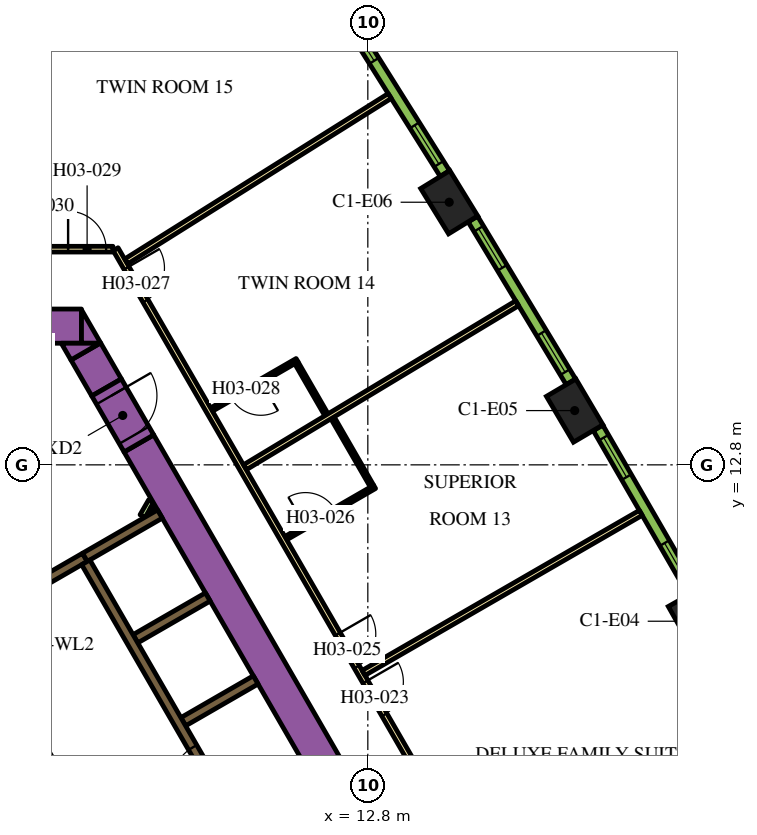
"""IFC4 building model, lengths in metres.
Left out: names, types, materials, properties, quantities, classifications, styles, units other than length and angle.
Written with IfcOpenShell. Run it as: python <this file> out.ifc"""

import sys

from ifc_helpers import new_model, si_unit, direction, frame, frame_2d, origin, origin_2d, place, context, subcontext, project, spatial, polyline, rectangle, outline, extrude, element, fill, save


model = new_model("IFC4")
c1 = context("Model", 3, precision=1e-05, world=origin(), true_north=direction((0.0, 1.0)))
c2 = subcontext(c1, "Body", "Model", "MODEL_VIEW")
j1 = project(units=[si_unit("LENGTHUNIT", "METRE"), si_unit("PLANEANGLEUNIT", "RADIAN")], contexts=[c1])
p1 = place(None, origin())
s1 = spatial("IfcSite", under=j1, at=p1, CompositionType="ELEMENT")
p2 = place(p1, origin())
s2 = spatial("IfcBuilding", under=s1, at=p2, CompositionType="ELEMENT")
p3 = place(p2, frame((0.0, 0.0, 58.8)))
s3 = spatial("IfcBuildingStorey", under=s2, at=p3, CompositionType="ELEMENT", Elevation=58.8)
for number, where, z_axis, x_axis in (
    (1, (21.443, 8.685, 0.0), (0.0, 0.0, 1.0), (-0.492, 0.871, 0.0)),
    (2, (18.243, 14.228, 0.0), (0.0, 0.0, 1.0), (-0.508, 0.861, 0.0)),
    (3, (14.942, 19.71, 0.0), (0.0, 0.0, 1.0), (-0.524, 0.852, 0.0)),
):
    element("IfcColumn", number, at=place(p3, frame(where, z_axis=z_axis, x_axis=x_axis)), inside=s3, PredefinedType="COLUMN", context=c2, shape_type="SweptSolid", body=[
        extrude(rectangle(XDim=1.4, YDim=0.9, at=origin_2d()), origin(), (0.0, 0.0, 1.0), 3.9),
    ])
p4 = place(p3, frame((6.776, 13.364, 0.0), z_axis=(0.0, 0.0, 1.0), x_axis=(0.500004177138, -0.8660229921, 0.0)))
e4 = element("IfcWall", 4, at=p4, inside=s3, PredefinedType="SOLIDWALL", context=c2, shape_type="SweptSolid", body=[
    extrude(rectangle(XDim=20.204, YDim=0.9, at=frame_2d((10.102, 0.0))), origin(), (0.0, 0.0, 1.0), 3.9),
])
p5 = place(p3, frame((-4.224, 16.45, 0.0), z_axis=(0.0, 0.0, 1.0), x_axis=(1.0, 0.0, 0.0)))
e5 = element("IfcWall", 5, at=p5, inside=s3, PredefinedType="SOLIDWALL", context=c2, shape_type="SweptSolid", body=[
    extrude(rectangle(XDim=9.488, YDim=0.9, at=frame_2d((4.744, 0.0))), origin(), (0.0, 0.0, 1.0), 3.9),
])
p6 = place(p3, origin())
e6 = element("IfcWall", 6, at=p6, inside=s3, PredefinedType="SOLIDWALL", context=c2, shape_type="SweptSolid", body=[
    extrude(outline(polyline([(5.265, 16.0), (5.265, 16.88), (5.773, 16.0), (5.265, 16.0)])), origin(), (0.0, 0.0, 1.0), 3.9),
])
p7 = place(p3, frame((5.926, 14.836, 0.0), z_axis=(0.0, 0.0, 1.0), x_axis=(-0.500076735116, 0.865981096212, 0.0)))
e7 = element("IfcWall", 7, at=p7, inside=s3, PredefinedType="SOLIDWALL", context=c2, shape_type="SweptSolid", body=[
    extrude(rectangle(XDim=1.094, YDim=0.9, at=frame_2d((0.547, 0.0))), origin(), (0.0, 0.0, 1.0), 3.9),
])
e8 = element("IfcWall", 8, at=p6, inside=s3, PredefinedType="SOLIDWALL", context=c2, shape_type="SweptSolid", body=[
    extrude(outline(polyline([(4.734, 16.0), (5.75, 16.0), (4.988, 15.56), (4.734, 16.0)])), origin(), (0.0, 0.0, 1.0), 3.9),
])
e9 = element("IfcWall", 9, at=p6, inside=s3, PredefinedType="SOLIDWALL", context=c2, shape_type="SweptSolid", body=[
    extrude(outline(polyline([(0.335, 6.925), (0.335, 6.925), (0.335, 7.075), (0.335, 7.075), (0.335, 7.075), (0.245, 7.075), (0.079, 7.363), (0.035, 7.439), (0.252, 7.564), (0.377, 7.348), (6.552, -3.348), (6.677, -3.564), (6.46, -3.689), (4.897, -0.981), (0.332, 6.925), (0.335, 6.925), (0.335, 6.925)])), origin(), (0.0, 0.0, 1.0), 3.9),
])
p8 = place(p3, frame((4.358, 9.791, 0.0), z_axis=(0.0, 0.0, 1.0), x_axis=(0.866079547155, 0.499906209203, 0.0)))
e10 = element("IfcWall", 10, at=p8, inside=s3, PredefinedType="SOLIDWALL", context=c2, shape_type="SweptSolid", body=[
    extrude(rectangle(XDim=1.15, YDim=0.25, at=frame_2d((0.575, 0.0))), origin(), (0.0, 0.0, 1.0), 3.9),
])
p9 = place(p3, frame((5.356, 10.367, 0.0), z_axis=(0.0, 0.0, 1.0), x_axis=(0.865978535641, 0.50008116922, 0.0)))
e11 = element("IfcWall", 11, at=p9, inside=s3, PredefinedType="SOLIDWALL", context=c2, shape_type="SweptSolid", body=[
    extrude(rectangle(XDim=2.278, YDim=0.25, at=frame_2d((1.139, 0.0))), origin(), (0.0, 0.0, 1.0), 3.9),
])
for number, where, z_axis, x_axis in (
    (12, (6.684, 8.224, 0.0), (0.0, 0.0, 1.0), (0.866, 0.5, 0.0)),
    (13, (7.944, 6.041, 0.0), (0.0, 0.0, 1.0), (0.866, 0.5, 0.0)),
):
    element("IfcWall", number, at=place(p3, frame(where, z_axis=z_axis, x_axis=x_axis)), inside=s3, PredefinedType="SOLIDWALL", context=c2, shape_type="SweptSolid", body=[
        extrude(rectangle(XDim=2.2, YDim=0.25, at=frame_2d((1.1, 0.0))), origin(), (0.0, 0.0, 1.0), 3.9),
    ])
p10 = place(p3, frame((6.872, 11.45, 0.0), z_axis=(0.0, 0.0, 1.0), x_axis=(0.499846793097, 0.866113839764, 0.0)))
e14 = element("IfcWall", 14, at=p10, inside=s3, PredefinedType="PARTITIONING", context=c2, shape_type="SweptSolid", body=[
    extrude(rectangle(XDim=0.453, YDim=0.15, at=frame_2d((0.227, 0.0))), origin(), (0.0, 0.0, 1.0), 2.75),
])
p11 = place(p3, frame((7.131, 11.6, 0.0), z_axis=(0.0, 0.0, 1.0), x_axis=(0.498600033135, 0.866832167699, 0.0)))
e15 = element("IfcWall", 15, at=p11, inside=s3, PredefinedType="PARTITIONING", context=c2, shape_type="SweptSolid", body=[
    extrude(rectangle(XDim=0.107, YDim=0.15, at=frame_2d((0.053, 0.0))), origin(), (0.0, 0.0, 1.0), 2.75),
])
p12 = place(p3, frame((11.553, -0.46, 0.0), z_axis=(0.0, 0.0, 1.0), x_axis=(-0.500006514828, 0.866021642414, 0.0)))
e16 = element("IfcWall", 16, at=p12, inside=s3, PredefinedType="SOLIDWALL", context=c2, shape_type="SweptSolid", body=[
    extrude(rectangle(XDim=12.35, YDim=0.25, at=frame_2d((6.175, 0.0))), origin(), (0.0, 0.0, 1.0), 3.9),
])
p13 = place(p12, frame((0.585, 0.0, 0.0)))
e17 = element("IfcOpeningElement", 17, at=p13, cuts=e16, PredefinedType="OPENING", context=c2, shape_type="SweptSolid", body=[
    extrude(rectangle(XDim=1.1, YDim=2.1, at=frame_2d((0.55, 1.05))), frame((0.0, 0.135, 0.0), z_axis=(0.0, -1.0, 0.0), x_axis=(1.0, 0.0, 0.0)), (0.0, 0.0, 1.0), 0.27),
])
p14 = place(p12, frame((3.105, 0.0, 0.0)))
e18 = element("IfcOpeningElement", 18, at=p14, cuts=e16, PredefinedType="OPENING", context=c2, shape_type="SweptSolid", body=[
    extrude(rectangle(XDim=1.1, YDim=2.1, at=frame_2d((0.55, 1.05))), frame((0.0, 0.135, 0.0), z_axis=(0.0, -1.0, 0.0), x_axis=(1.0, 0.0, 0.0)), (0.0, 0.0, 1.0), 0.27),
])
p15 = place(p12, frame((5.625, 0.0, 0.0)))
e19 = element("IfcOpeningElement", 19, at=p15, cuts=e16, PredefinedType="OPENING", context=c2, shape_type="SweptSolid", body=[
    extrude(rectangle(XDim=1.1, YDim=2.1, at=frame_2d((0.55, 1.05))), frame((0.0, 0.135, 0.0), z_axis=(0.0, -1.0, 0.0), x_axis=(1.0, 0.0, 0.0)), (0.0, 0.0, 1.0), 0.27),
])
p16 = place(p3, frame((8.565, -2.185, 0.0), z_axis=(0.0, 0.0, 1.0), x_axis=(-0.499997954832, 0.866026584559, 0.0)))
e20 = element("IfcWall", 20, at=p16, inside=s3, PredefinedType="SOLIDWALL", context=c2, shape_type="SweptSolid", body=[
    extrude(rectangle(XDim=12.35, YDim=0.25, at=frame_2d((6.175, 0.0))), origin(), (0.0, 0.0, 1.0), 3.9),
])
p17 = place(p16, frame((5.725, 0.0, 0.0)))
e21 = element("IfcOpeningElement", 21, at=p17, cuts=e20, PredefinedType="OPENING", context=c2, shape_type="SweptSolid", body=[
    extrude(rectangle(XDim=0.9, YDim=2.1, at=frame_2d((0.45, 1.05))), frame((0.0, 0.135, 0.0), z_axis=(0.0, -1.0, 0.0), x_axis=(1.0, 0.0, 0.0)), (0.0, 0.0, 1.0), 0.27),
])
p18 = place(p3, frame((5.926, 14.836, 0.0), z_axis=(0.0, 0.0, 1.0), x_axis=(0.500062241894, -0.865989465428, 0.0)))
e22 = element("IfcWall", 22, at=p18, inside=s3, PredefinedType="SOLIDWALL", context=c2, shape_type="SweptSolid", body=[
    extrude(rectangle(XDim=1.7, YDim=0.9, at=frame_2d((0.85, 0.0))), origin(), (0.0, 0.0, 1.0), 3.9),
])
p19 = place(p18, frame((0.25, 0.0, 0.0)))
e23 = element("IfcOpeningElement", 23, at=p19, cuts=e22, PredefinedType="OPENING", context=c2, shape_type="SweptSolid", body=[
    extrude(rectangle(XDim=1.2, YDim=2.1, at=frame_2d((0.6, 1.05))), frame((0.0, 0.46, 0.0), z_axis=(0.0, -1.0, 0.0), x_axis=(1.0, 0.0, 0.0)), (0.0, 0.0, 1.0), 0.92),
])
p20 = place(p3, frame((6.163, 18.475, 0.0), z_axis=(0.0, 0.0, 1.0), x_axis=(0.500001317485, -0.866024643133, 0.0)))
e24 = element("IfcWall", 24, at=p20, inside=s3, PredefinedType="PARTITIONING", context=c2, shape_type="SweptSolid", body=[
    extrude(rectangle(XDim=25.767, YDim=0.15, at=frame_2d((12.883, 0.0))), origin(), (0.0, 0.0, 1.0), 2.75),
])
p21 = place(p20, frame((24.586, 0.0, 0.0)))
e25 = element("IfcOpeningElement", 25, at=p21, cuts=e24, PredefinedType="OPENING", context=c2, shape_type="SweptSolid", body=[
    extrude(rectangle(XDim=1.0, YDim=2.1, at=frame_2d((0.5, 1.05))), frame((0.0, 0.085, 0.0), z_axis=(0.0, -1.0, 0.0), x_axis=(1.0, 0.0, 0.0)), (0.0, 0.0, 1.0), 0.17),
])
p22 = place(p20, frame((13.144, 0.0, 0.0)))
e26 = element("IfcOpeningElement", 26, at=p22, cuts=e24, PredefinedType="OPENING", context=c2, shape_type="SweptSolid", body=[
    extrude(rectangle(XDim=1.0, YDim=2.1, at=frame_2d((0.5, 1.05))), frame((0.0, 0.085, 0.0), z_axis=(0.0, -1.0, 0.0), x_axis=(1.0, 0.0, 0.0)), (0.0, 0.0, 1.0), 0.17),
])
p23 = place(p20, frame((11.692, 0.0, 0.0)))
e27 = element("IfcOpeningElement", 27, at=p23, cuts=e24, PredefinedType="OPENING", context=c2, shape_type="SweptSolid", body=[
    extrude(rectangle(XDim=1.0, YDim=2.1, at=frame_2d((0.5, 1.05))), frame((0.0, 0.085, 0.0), z_axis=(0.0, -1.0, 0.0), x_axis=(1.0, 0.0, 0.0)), (0.0, 0.0, 1.0), 0.17),
])
p24 = place(p20, frame((0.572, 0.0, 0.0)))
e28 = element("IfcOpeningElement", 28, at=p24, cuts=e24, PredefinedType="OPENING", context=c2, shape_type="SweptSolid", body=[
    extrude(rectangle(XDim=1.0, YDim=2.1, at=frame_2d((0.5, 1.05))), frame((0.0, 0.085, 0.0), z_axis=(0.0, -1.0, 0.0), x_axis=(1.0, 0.0, 0.0)), (0.0, 0.0, 1.0), 0.17),
])
p25 = place(p3, frame((0.825, 18.475, 0.0), z_axis=(0.0, 0.0, 1.0), x_axis=(1.0, 0.0, 0.0)))
e29 = element("IfcWall", 29, at=p25, inside=s3, PredefinedType="PARTITIONING", context=c2, shape_type="SweptSolid", body=[
    extrude(rectangle(XDim=5.268, YDim=0.15, at=frame_2d((2.634, 0.0))), origin(), (0.0, 0.0, 1.0), 2.75),
])
p26 = place(p25, frame((4.088, 0.0, 0.0)))
e30 = element("IfcOpeningElement", 30, at=p26, cuts=e29, PredefinedType="OPENING", context=c2, shape_type="SweptSolid", body=[
    extrude(rectangle(XDim=1.0, YDim=2.1, at=frame_2d((0.5, 1.05))), frame((0.0, 0.085, 0.0), z_axis=(0.0, -1.0, 0.0), x_axis=(1.0, 0.0, 0.0)), (0.0, 0.0, 1.0), 0.17),
])
p27 = place(p3, frame((9.922, 27.896, 0.0), z_axis=(0.0, 0.0, 1.0), x_axis=(-0.836970816595, -0.547247523675, 0.0)))
e31 = element("IfcWall", 31, at=p27, inside=s3, PredefinedType="PARTITIONING", context=c2, shape_type="SweptSolid", body=[
    extrude(rectangle(XDim=10.729, YDim=0.15, at=frame_2d((5.364, 0.0))), origin(), (0.0, 0.0, 1.0), 2.75),
])
p28 = place(p3, frame((13.376, 22.506, 0.0), z_axis=(0.0, 0.0, 1.0), x_axis=(-0.846945608893, -0.531679542183, 0.0)))
e32 = element("IfcWall", 32, at=p28, inside=s3, PredefinedType="PARTITIONING", context=c2, shape_type="SweptSolid", body=[
    extrude(rectangle(XDim=8.182, YDim=0.15, at=frame_2d((4.091, 0.0))), origin(), (0.0, 0.0, 1.0), 2.75),
])
p29 = place(p3, frame((16.729, 17.052, 0.0), z_axis=(0.0, 0.0, 1.0), x_axis=(-0.856630606266, -0.515930232113, 0.0)))
e33 = element("IfcWall", 33, at=p29, inside=s3, PredefinedType="PARTITIONING", context=c2, shape_type="SweptSolid", body=[
    extrude(rectangle(XDim=8.355, YDim=0.15, at=frame_2d((4.178, 0.0))), origin(), (0.0, 0.0, 1.0), 2.75),
])
p30 = place(p3, frame((19.982, 11.537, 0.0), z_axis=(0.0, 0.0, 1.0), x_axis=(-0.866020994654, -0.500007636761, 0.0)))
e34 = element("IfcWall", 34, at=p30, inside=s3, PredefinedType="PARTITIONING", context=c2, shape_type="SweptSolid", body=[
    extrude(rectangle(XDim=8.423, YDim=0.15, at=frame_2d((4.211, 0.0))), origin(), (0.0, 0.0, 1.0), 2.75),
])
p31 = place(p3, frame((10.64, 10.871, 0.0), z_axis=(0.0, 0.0, 1.0), x_axis=(0.866036505625, 0.499980770555, 0.0)))
e35 = element("IfcWall", 35, at=p31, inside=s3, PredefinedType="PARTITIONING", context=c2, shape_type="SweptSolid", body=[
    extrude(rectangle(XDim=2.7, YDim=0.1, at=frame_2d((1.35, 0.0))), origin(), (0.0, 0.0, 1.0), 2.75),
])
p32 = place(p31, frame((0.6, 0.0, 0.0)))
e36 = element("IfcOpeningElement", 36, at=p32, cuts=e35, PredefinedType="OPENING", context=c2, shape_type="SweptSolid", body=[
    extrude(rectangle(XDim=0.9, YDim=2.1, at=frame_2d((0.45, 1.05))), frame((0.0, 0.06, 0.0), z_axis=(0.0, -1.0, 0.0), x_axis=(1.0, 0.0, 0.0)), (0.0, 0.0, 1.0), 0.12),
])
p33 = place(p3, frame((12.91, 12.239, 0.0), z_axis=(0.0, 0.0, 1.0), x_axis=(-0.499957272447, 0.866050071143, 0.0)))
e37 = element("IfcWall", 37, at=p33, inside=s3, PredefinedType="PARTITIONING", context=c2, shape_type="SweptSolid", body=[
    extrude(rectangle(XDim=2.07, YDim=0.1, at=frame_2d((1.035, 0.0))), origin(), (0.0, 0.0, 1.0), 2.75),
])
p34 = place(p3, frame((10.938, 15.554, 0.0), z_axis=(0.0, 0.0, 1.0), x_axis=(-0.866062058628, -0.499936506574, 0.0)))
e38 = element("IfcWall", 38, at=p34, inside=s3, PredefinedType="PARTITIONING", context=c2, shape_type="SweptSolid", body=[
    extrude(rectangle(XDim=2.6, YDim=0.1, at=frame_2d((1.3, 0.0))), origin(), (0.0, 0.0, 1.0), 2.75),
])
p35 = place(p34, frame((1.1, 0.0, 0.0)))
e39 = element("IfcOpeningElement", 39, at=p35, cuts=e38, PredefinedType="OPENING", context=c2, shape_type="SweptSolid", body=[
    extrude(rectangle(XDim=0.9, YDim=2.1, at=frame_2d((0.45, 1.05))), frame((0.0, 0.06, 0.0), z_axis=(0.0, -1.0, 0.0), x_axis=(1.0, 0.0, 0.0)), (0.0, 0.0, 1.0), 0.12),
])
p36 = place(p3, frame((10.92, 15.486, 0.0), z_axis=(0.0, 0.0, 1.0), x_axis=(0.499994407638, -0.866028632512, 0.0)))
e40 = element("IfcWall", 40, at=p36, inside=s3, PredefinedType="PARTITIONING", context=c2, shape_type="SweptSolid", body=[
    extrude(rectangle(XDim=1.58, YDim=0.1, at=frame_2d((0.79, 0.0))), origin(), (0.0, 0.0, 1.0), 2.75),
])
p37 = place(p3, frame((21.357, 9.445, 0.0), z_axis=(0.0, 0.0, 1.0), x_axis=(-0.50002123722, 0.866013142123, 0.0)))
e41 = element("IfcWall", 41, at=p37, inside=s3, PredefinedType="SOLIDWALL", context=c2, shape_type="SweptSolid", body=[
    extrude(rectangle(XDim=4.998, YDim=0.29, at=frame_2d((2.499, 0.0))), origin(), (0.0, 0.0, 1.0), 3.65),
])
p38 = place(p37, frame((0.297, 0.0, 0.9)))
e42 = element("IfcOpeningElement", 42, at=p38, cuts=e41, PredefinedType="OPENING", context=c2, shape_type="SweptSolid", body=[
    extrude(rectangle(XDim=1.2, YDim=2.15, at=frame_2d((0.6, 1.075))), frame((0.0, 0.155, 0.0), z_axis=(0.0, -1.0, 0.0), x_axis=(1.0, 0.0, 0.0)), (0.0, 0.0, 1.0), 0.31),
])
p39 = place(p37, frame((3.501, 0.0, 0.9)))
e43 = element("IfcOpeningElement", 43, at=p39, cuts=e41, PredefinedType="OPENING", context=c2, shape_type="SweptSolid", body=[
    extrude(rectangle(XDim=1.2, YDim=2.15, at=frame_2d((0.6, 1.075))), frame((0.0, 0.155, 0.0), z_axis=(0.0, -1.0, 0.0), x_axis=(1.0, 0.0, 0.0)), (0.0, 0.0, 1.0), 0.31),
])
p40 = place(p3, frame((18.143, 14.986, 0.0), z_axis=(0.0, 0.0, 1.0), x_axis=(-0.515938796285, 0.856625448191, 0.0)))
e44 = element("IfcWall", 44, at=p40, inside=s3, PredefinedType="SOLIDWALL", context=c2, shape_type="SweptSolid", body=[
    extrude(rectangle(XDim=4.998, YDim=0.29, at=frame_2d((2.499, 0.0))), origin(), (0.0, 0.0, 1.0), 3.65),
])
p41 = place(p40, frame((0.297, 0.0, 0.9)))
e45 = element("IfcOpeningElement", 45, at=p41, cuts=e44, PredefinedType="OPENING", context=c2, shape_type="SweptSolid", body=[
    extrude(rectangle(XDim=1.2, YDim=2.15, at=frame_2d((0.6, 1.075))), frame((0.0, 0.155, 0.0), z_axis=(0.0, -1.0, 0.0), x_axis=(1.0, 0.0, 0.0)), (0.0, 0.0, 1.0), 0.31),
])
p42 = place(p40, frame((3.501, 0.0, 0.9)))
e46 = element("IfcOpeningElement", 46, at=p42, cuts=e44, PredefinedType="OPENING", context=c2, shape_type="SweptSolid", body=[
    extrude(rectangle(XDim=1.2, YDim=2.15, at=frame_2d((0.6, 1.075))), frame((0.0, 0.155, 0.0), z_axis=(0.0, -1.0, 0.0), x_axis=(1.0, 0.0, 0.0)), (0.0, 0.0, 1.0), 0.31),
])
p43 = place(p3, frame((14.827, 20.466, 0.0), z_axis=(0.0, 0.0, 1.0), x_axis=(-0.531688286542, 0.846940119462, 0.0)))
e47 = element("IfcWall", 47, at=p43, inside=s3, PredefinedType="SOLIDWALL", context=c2, shape_type="SweptSolid", body=[
    extrude(rectangle(XDim=4.998, YDim=0.29, at=frame_2d((2.499, 0.0))), origin(), (0.0, 0.0, 1.0), 3.65),
])
p44 = place(p43, frame((0.297, 0.0, 0.9)))
e48 = element("IfcOpeningElement", 48, at=p44, cuts=e47, PredefinedType="OPENING", context=c2, shape_type="SweptSolid", body=[
    extrude(rectangle(XDim=1.2, YDim=2.15, at=frame_2d((0.6, 1.075))), frame((0.0, 0.155, 0.0), z_axis=(0.0, -1.0, 0.0), x_axis=(1.0, 0.0, 0.0)), (0.0, 0.0, 1.0), 0.31),
])
p45 = place(p43, frame((3.501, 0.0, 0.9)))
e49 = element("IfcOpeningElement", 49, at=p45, cuts=e47, PredefinedType="OPENING", context=c2, shape_type="SweptSolid", body=[
    extrude(rectangle(XDim=1.2, YDim=2.15, at=frame_2d((0.6, 1.075))), frame((0.0, 0.155, 0.0), z_axis=(0.0, -1.0, 0.0), x_axis=(1.0, 0.0, 0.0)), (0.0, 0.0, 1.0), 0.31),
])
p46 = place(p15, origin())
e50 = element("IfcDoor", 50, at=p46, inside=s3, OperationType="DOUBLE_DOOR_SLIDING", PredefinedType="DOOR", context=c2, shape_type="SweptSolid", body=[
    extrude(rectangle(XDim=1.1, YDim=2.1, at=frame_2d((0.55, 1.05))), frame((0.0, 0.025, 0.0), z_axis=(0.0, -1.0, 0.0), x_axis=(1.0, 0.0, 0.0)), (0.0, 0.0, 1.0), 0.05),
])
fill(e19, e50)
p47 = place(p19, origin())
e51 = element("IfcDoor", 51, at=p47, inside=s3, OperationType="SINGLE_SWING_LEFT", PredefinedType="DOOR", context=c2, shape_type="SweptSolid", body=[
    extrude(rectangle(XDim=1.2, YDim=2.1, at=frame_2d((0.6, 1.05))), frame((0.0, 0.025, 0.0), z_axis=(0.0, -1.0, 0.0), x_axis=(1.0, 0.0, 0.0)), (0.0, 0.0, 1.0), 0.05),
])
fill(e23, e51)
p48 = place(p22, origin())
e52 = element("IfcDoor", 52, at=p48, inside=s3, OperationType="SINGLE_SWING_LEFT", PredefinedType="DOOR", context=c2, shape_type="SweptSolid", body=[
    extrude(rectangle(XDim=1.0, YDim=2.1, at=frame_2d((0.5, 1.05))), frame((0.0, 0.025, 0.0), z_axis=(0.0, -1.0, 0.0), x_axis=(1.0, 0.0, 0.0)), (0.0, 0.0, 1.0), 0.05),
])
fill(e26, e52)
p49 = place(p23, origin())
e53 = element("IfcDoor", 53, at=p49, inside=s3, OperationType="SINGLE_SWING_RIGHT", PredefinedType="DOOR", context=c2, shape_type="SweptSolid", body=[
    extrude(rectangle(XDim=1.0, YDim=2.1, at=frame_2d((0.5, 1.05))), frame((0.0, 0.025, 0.0), z_axis=(0.0, -1.0, 0.0), x_axis=(1.0, 0.0, 0.0)), (0.0, 0.0, 1.0), 0.05),
])
fill(e27, e53)
p50 = place(p32, origin())
e54 = element("IfcDoor", 54, at=p50, inside=s3, OperationType="SINGLE_SWING_LEFT", PredefinedType="DOOR", context=c2, shape_type="SweptSolid", body=[
    extrude(rectangle(XDim=0.9, YDim=2.1, at=frame_2d((0.45, 1.05))), frame((0.0, 0.025, 0.0), z_axis=(0.0, -1.0, 0.0), x_axis=(1.0, 0.0, 0.0)), (0.0, 0.0, 1.0), 0.05),
])
fill(e36, e54)
p51 = place(p24, origin())
e55 = element("IfcDoor", 55, at=p51, inside=s3, OperationType="SINGLE_SWING_LEFT", PredefinedType="DOOR", context=c2, shape_type="SweptSolid", body=[
    extrude(rectangle(XDim=1.0, YDim=2.1, at=frame_2d((0.5, 1.05))), frame((0.0, 0.025, 0.0), z_axis=(0.0, -1.0, 0.0), x_axis=(1.0, 0.0, 0.0)), (0.0, 0.0, 1.0), 0.05),
])
fill(e28, e55)
p52 = place(p35, origin())
e56 = element("IfcDoor", 56, at=p52, inside=s3, OperationType="SINGLE_SWING_LEFT", PredefinedType="DOOR", context=c2, shape_type="SweptSolid", body=[
    extrude(rectangle(XDim=0.9, YDim=2.1, at=frame_2d((0.45, 1.05))), frame((0.0, 0.025, 0.0), z_axis=(0.0, -1.0, 0.0), x_axis=(1.0, 0.0, 0.0)), (0.0, 0.0, 1.0), 0.05),
])
fill(e39, e56)
p53 = place(p26, origin())
e57 = element("IfcDoor", 57, at=p53, inside=s3, OperationType="SINGLE_SWING_RIGHT", PredefinedType="DOOR", context=c2, shape_type="SweptSolid", body=[
    extrude(rectangle(XDim=1.0, YDim=2.1, at=frame_2d((0.5, 1.05))), frame((0.0, 0.025, 0.0), z_axis=(0.0, -1.0, 0.0), x_axis=(1.0, 0.0, 0.0)), (0.0, 0.0, 1.0), 0.05),
])
fill(e30, e57)
p54 = place(p38, origin())
e58 = element("IfcWindow", 58, at=p54, inside=s3, PartitioningType="DOUBLE_PANEL_VERTICAL", PredefinedType="WINDOW", context=c2, shape_type="SweptSolid", body=[
    extrude(rectangle(XDim=1.2, YDim=2.15, at=frame_2d((0.6, 1.075))), frame((0.0, 0.015, 0.0), z_axis=(0.0, -1.0, 0.0), x_axis=(1.0, 0.0, 0.0)), (0.0, 0.0, 1.0), 0.06),
])
fill(e42, e58)
p55 = place(p39, origin())
e59 = element("IfcWindow", 59, at=p55, inside=s3, PartitioningType="DOUBLE_PANEL_VERTICAL", PredefinedType="WINDOW", context=c2, shape_type="SweptSolid", body=[
    extrude(rectangle(XDim=1.2, YDim=2.15, at=frame_2d((0.6, 1.075))), frame((0.0, 0.015, 0.0), z_axis=(0.0, -1.0, 0.0), x_axis=(1.0, 0.0, 0.0)), (0.0, 0.0, 1.0), 0.06),
])
fill(e43, e59)
p56 = place(p41, origin())
e60 = element("IfcWindow", 60, at=p56, inside=s3, PartitioningType="DOUBLE_PANEL_VERTICAL", PredefinedType="WINDOW", context=c2, shape_type="SweptSolid", body=[
    extrude(rectangle(XDim=1.2, YDim=2.15, at=frame_2d((0.6, 1.075))), frame((0.0, 0.015, 0.0), z_axis=(0.0, -1.0, 0.0), x_axis=(1.0, 0.0, 0.0)), (0.0, 0.0, 1.0), 0.06),
])
fill(e45, e60)
p57 = place(p42, origin())
e61 = element("IfcWindow", 61, at=p57, inside=s3, PartitioningType="DOUBLE_PANEL_VERTICAL", PredefinedType="WINDOW", context=c2, shape_type="SweptSolid", body=[
    extrude(rectangle(XDim=1.2, YDim=2.15, at=frame_2d((0.6, 1.075))), frame((0.0, 0.015, 0.0), z_axis=(0.0, -1.0, 0.0), x_axis=(1.0, 0.0, 0.0)), (0.0, 0.0, 1.0), 0.06),
])
fill(e46, e61)
p58 = place(p44, origin())
e62 = element("IfcWindow", 62, at=p58, inside=s3, PartitioningType="DOUBLE_PANEL_VERTICAL", PredefinedType="WINDOW", context=c2, shape_type="SweptSolid", body=[
    extrude(rectangle(XDim=1.2, YDim=2.15, at=frame_2d((0.6, 1.075))), frame((0.0, 0.015, 0.0), z_axis=(0.0, -1.0, 0.0), x_axis=(1.0, 0.0, 0.0)), (0.0, 0.0, 1.0), 0.06),
])
fill(e48, e62)
p59 = place(p45, origin())
e63 = element("IfcWindow", 63, at=p59, inside=s3, PartitioningType="DOUBLE_PANEL_VERTICAL", PredefinedType="WINDOW", context=c2, shape_type="SweptSolid", body=[
    extrude(rectangle(XDim=1.2, YDim=2.15, at=frame_2d((0.6, 1.075))), frame((0.0, 0.015, 0.0), z_axis=(0.0, -1.0, 0.0), x_axis=(1.0, 0.0, 0.0)), (0.0, 0.0, 1.0), 0.06),
])
fill(e49, e63)
save(model, sys.argv[1])
